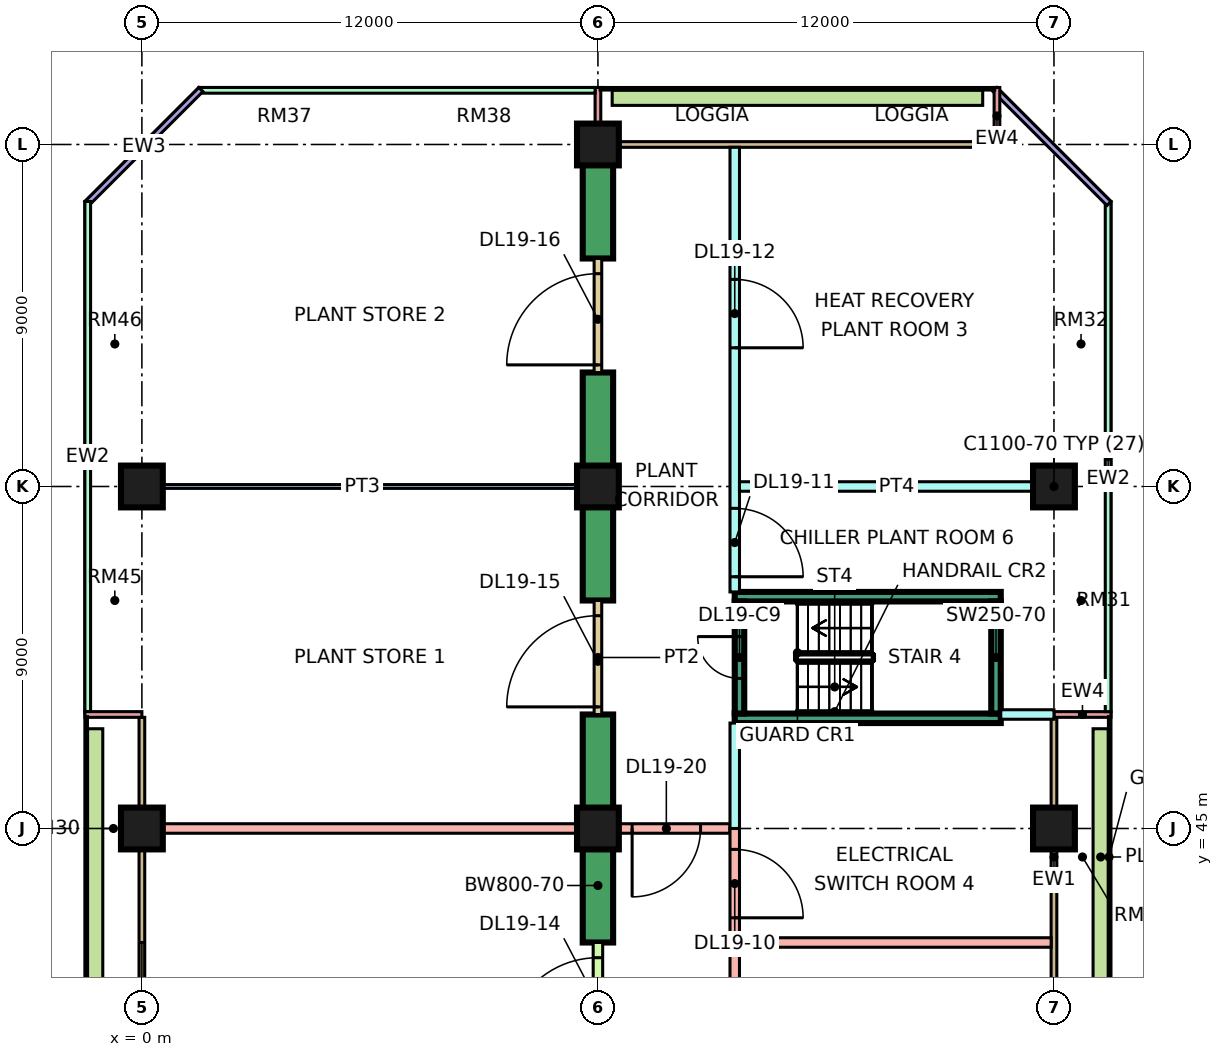
"""IFC4 building model, lengths in metres.
Left out: names, types, materials, properties, quantities, classifications, styles, units other than length and angle.
Written with IfcOpenShell. Run it as: python <this file> out.ifc"""

import sys

from ifc_helpers import new_model, si_unit, direction, frame, frame_2d, origin, origin_2d, place, context, subcontext, project, spatial, rectangle, extrude, element, fill, save


model = new_model("IFC4")
c1 = context("Model", 3, precision=1e-05, world=origin(), true_north=direction((0.0, 1.0)))
c2 = subcontext(c1, "Body", "Model", "MODEL_VIEW")
j1 = project(units=[si_unit("LENGTHUNIT", "METRE"), si_unit("PLANEANGLEUNIT", "RADIAN")], contexts=[c1])
p1 = place(None, origin())
s1 = spatial("IfcSite", under=j1, at=p1, CompositionType="ELEMENT")
p2 = place(p1, origin())
s2 = spatial("IfcBuilding", under=s1, at=p2, CompositionType="ELEMENT")
p3 = place(p2, frame((0.0, 0.0, 86.4)))
s3 = spatial("IfcBuildingStorey", under=s2, at=p3, CompositionType="ELEMENT", Elevation=86.4)
p4 = place(p3, frame((0.0, 45.0, 0.0), z_axis=(0.0, 0.0, 1.0), x_axis=(1.0, 0.0, 0.0)))
e1 = element("IfcColumn", 1, at=p4, inside=s3, PredefinedType="COLUMN", context=c2, shape_type="SweptSolid", body=[
    extrude(rectangle(XDim=1.1, YDim=1.1, at=origin_2d()), origin(), (0.0, 0.0, 1.0), 5.5),
])
p5 = place(p3, frame((0.0, 54.0, 0.0), z_axis=(0.0, 0.0, 1.0), x_axis=(1.0, 0.0, 0.0)))
e2 = element("IfcColumn", 2, at=p5, inside=s3, PredefinedType="COLUMN", context=c2, shape_type="SweptSolid", body=[
    extrude(rectangle(XDim=1.1, YDim=1.1, at=origin_2d()), origin(), (0.0, 0.0, 1.0), 5.5),
])
for number, where, z_axis, x_axis in (
    (3, (12.0, 45.0, 0.0), (0.0, 0.0, 1.0), (1.0, 0.0, 0.0)),
    (4, (12.0, 54.0, 0.0), (0.0, 0.0, 1.0), (1.0, 0.0, 0.0)),
    (5, (12.0, 63.0, 0.0), (0.0, 0.0, 1.0), (1.0, 0.0, 0.0)),
    (6, (24.0, 45.0, 0.0), (0.0, 0.0, 1.0), (1.0, 0.0, 0.0)),
    (7, (24.0, 54.0, 0.0), (0.0, 0.0, 1.0), (1.0, 0.0, 0.0)),
):
    element("IfcColumn", number, at=place(p3, frame(where, z_axis=z_axis, x_axis=x_axis)), inside=s3, PredefinedType="COLUMN", context=c2, shape_type="SweptSolid", body=[
        extrude(rectangle(XDim=1.1, YDim=1.1, at=origin_2d()), origin(), (0.0, 0.0, 1.0), 5.5),
    ])
for number, where, z_axis, x_axis in (
    (8, (15.6, 47.9, 0.0), (0.0, 0.0, 1.0), (1.0, 0.0, 0.0)),
    (9, (15.6, 51.1, 0.0), (0.0, 0.0, 1.0), (1.0, 0.0, 0.0)),
):
    element("IfcWall", number, at=place(p3, frame(where, z_axis=z_axis, x_axis=x_axis)), inside=s3, PredefinedType="SHEAR", context=c2, shape_type="SweptSolid", body=[
        extrude(rectangle(XDim=7.0, YDim=0.25, at=frame_2d((3.5, 0.0))), origin(), (0.0, 0.0, 1.0), 5.5),
    ])
p6 = place(p3, frame((15.725, 48.025, 0.0), z_axis=(0.0, 0.0, 1.0), x_axis=(0.0, 1.0, 0.0)))
e10 = element("IfcWall", 10, at=p6, inside=s3, PredefinedType="SHEAR", context=c2, shape_type="SweptSolid", body=[
    extrude(rectangle(XDim=2.95, YDim=0.25, at=frame_2d((1.475, 0.0))), origin(), (0.0, 0.0, 1.0), 5.5),
])
p7 = place(p6, frame((0.925, 0.0, 0.0)))
e11 = element("IfcOpeningElement", 11, at=p7, cuts=e10, PredefinedType="OPENING", context=c2, shape_type="SweptSolid", body=[
    extrude(rectangle(XDim=1.1, YDim=2.2, at=frame_2d((0.55, 1.1))), frame((0.0, 0.135, 0.0), z_axis=(0.0, -1.0, 0.0), x_axis=(1.0, 0.0, 0.0)), (0.0, 0.0, 1.0), 0.27),
])
p8 = place(p3, frame((22.475, 48.025, 0.0), z_axis=(0.0, 0.0, 1.0), x_axis=(0.0, 1.0, 0.0)))
e12 = element("IfcWall", 12, at=p8, inside=s3, PredefinedType="SHEAR", context=c2, shape_type="SweptSolid", body=[
    extrude(rectangle(XDim=2.95, YDim=0.25, at=frame_2d((1.475, 0.0))), origin(), (0.0, 0.0, 1.0), 5.5),
])
for number, where, z_axis, x_axis in (
    (13, (12.0, 42.0, 0.0), (0.0, 0.0, 1.0), (0.0, 1.0, 0.0)),
    (14, (12.0, 45.0, 0.0), (0.0, 0.0, 1.0), (0.0, 1.0, 0.0)),
    (15, (12.0, 51.0, 0.0), (0.0, 0.0, 1.0), (0.0, 1.0, 0.0)),
    (16, (12.0, 54.0, 0.0), (0.0, 0.0, 1.0), (0.0, 1.0, 0.0)),
    (17, (12.0, 60.0, 0.0), (0.0, 0.0, 1.0), (0.0, 1.0, 0.0)),
):
    element("IfcWall", number, at=place(p3, frame(where, z_axis=z_axis, x_axis=x_axis)), inside=s3, PredefinedType="SHEAR", context=c2, shape_type="SweptSolid", body=[
        extrude(rectangle(XDim=3.0, YDim=0.8, at=frame_2d((1.5, 0.0))), origin(), (0.0, 0.0, 1.0), 5.1),
    ])
p9 = place(p3, frame((24.0, 40.575, 0.0), z_axis=(0.0, 0.0, 1.0), x_axis=(0.0, 1.0, 0.0)))
e18 = element("IfcWall", 18, at=p9, inside=s3, PredefinedType="SOLIDWALL", context=c2, shape_type="SweptSolid", body=[
    extrude(rectangle(XDim=7.35, YDim=0.15, at=frame_2d((3.675, 0.0))), origin(), (0.0, 0.0, 1.0), 5.1),
])
p10 = place(p3, frame((25.5, 48.0, 0.0), z_axis=(0.0, 0.0, 1.0), x_axis=(-1.0, 0.0, 0.0)))
e19 = element("IfcWall", 19, at=p10, inside=s3, PredefinedType="SOLIDWALL", context=c2, shape_type="SweptSolid", body=[
    extrude(rectangle(XDim=1.5, YDim=0.15, at=frame_2d((0.75, 0.0))), origin(), (0.0, 0.0, 1.0), 5.1),
])
p11 = place(p3, frame((25.425, 48.075, 0.0), z_axis=(0.0, 0.0, 1.0), x_axis=(0.0, 1.0, 0.0)))
e20 = element("IfcWall", 20, at=p11, inside=s3, PredefinedType="SOLIDWALL", context=c2, shape_type="SweptSolid", body=[
    extrude(rectangle(XDim=13.425, YDim=0.15, at=frame_2d((6.712, 0.0))), origin(), (0.0, 0.0, 1.0), 5.1),
])
p12 = place(p3, frame((25.447, 61.447, 0.0), z_axis=(0.0, 0.0, 1.0), x_axis=(-0.707106781187, 0.707106781187, 0.0)))
e21 = element("IfcWall", 21, at=p12, inside=s3, PredefinedType="SOLIDWALL", context=c2, shape_type="SweptSolid", body=[
    extrude(rectangle(XDim=4.243, YDim=0.15, at=frame_2d((2.121, 0.0))), origin(), (0.0, 0.0, 1.0), 5.1),
])
p13 = place(p3, frame((22.425, 63.0, 0.0), z_axis=(0.0, 0.0, 1.0), x_axis=(-1.0, 0.0, 0.0)))
e22 = element("IfcWall", 22, at=p13, inside=s3, PredefinedType="SOLIDWALL", context=c2, shape_type="SweptSolid", body=[
    extrude(rectangle(XDim=10.35, YDim=0.15, at=frame_2d((5.175, 0.0))), origin(), (0.0, 0.0, 1.0), 5.1),
])
for number, where, z_axis, x_axis in (
    (23, (22.5, 64.5, 0.0), (0.0, 0.0, 1.0), (0.0, -1.0, 0.0)),
    (24, (12.0, 64.5, 0.0), (0.0, 0.0, 1.0), (0.0, -1.0, 0.0)),
):
    element("IfcWall", number, at=place(p3, frame(where, z_axis=z_axis, x_axis=x_axis)), inside=s3, PredefinedType="SOLIDWALL", context=c2, shape_type="SweptSolid", body=[
        extrude(rectangle(XDim=1.5, YDim=0.15, at=frame_2d((0.75, 0.0))), origin(), (0.0, 0.0, 1.0), 5.1),
    ])
p14 = place(p3, frame((11.925, 64.425, 0.0), z_axis=(0.0, 0.0, 1.0), x_axis=(-1.0, 0.0, 0.0)))
e25 = element("IfcWall", 25, at=p14, inside=s3, PredefinedType="SOLIDWALL", context=c2, shape_type="SweptSolid", body=[
    extrude(rectangle(XDim=10.425, YDim=0.15, at=frame_2d((5.212, 0.0))), origin(), (0.0, 0.0, 1.0), 5.1),
])
p15 = place(p3, frame((1.553, 64.447, 0.0), z_axis=(0.0, 0.0, 1.0), x_axis=(-0.707106781187, -0.707106781187, 0.0)))
e26 = element("IfcWall", 26, at=p15, inside=s3, PredefinedType="SOLIDWALL", context=c2, shape_type="SweptSolid", body=[
    extrude(rectangle(XDim=4.243, YDim=0.15, at=frame_2d((2.121, 0.0))), origin(), (0.0, 0.0, 1.0), 5.1),
])
p16 = place(p3, frame((-1.425, 61.5, 0.0), z_axis=(0.0, 0.0, 1.0), x_axis=(0.0, -1.0, 0.0)))
e27 = element("IfcWall", 27, at=p16, inside=s3, PredefinedType="SOLIDWALL", context=c2, shape_type="SweptSolid", body=[
    extrude(rectangle(XDim=13.425, YDim=0.15, at=frame_2d((6.712, 0.0))), origin(), (0.0, 0.0, 1.0), 5.1),
])
p17 = place(p3, frame((0.0, 47.925, 0.0), z_axis=(0.0, 0.0, 1.0), x_axis=(0.0, -1.0, 0.0)))
e28 = element("IfcWall", 28, at=p17, inside=s3, PredefinedType="SOLIDWALL", context=c2, shape_type="SweptSolid", body=[
    extrude(rectangle(XDim=11.85, YDim=0.15, at=frame_2d((5.925, 0.0))), origin(), (0.0, 0.0, 1.0), 5.1),
])
p18 = place(p17, frame((5.925, 0.0, 0.45)))
e29 = element("IfcOpeningElement", 29, at=p18, cuts=e28, PredefinedType="OPENING", context=c2, shape_type="SweptSolid", body=[
    extrude(rectangle(XDim=3.0, YDim=3.6, at=frame_2d((1.5, 1.8))), frame((0.0, 0.085, 0.0), z_axis=(0.0, -1.0, 0.0), x_axis=(1.0, 0.0, 0.0)), (0.0, 0.0, 1.0), 0.17),
])
p19 = place(p3, frame((-1.5, 48.0, 0.0), z_axis=(0.0, 0.0, 1.0), x_axis=(1.0, 0.0, 0.0)))
e30 = element("IfcWall", 30, at=p19, inside=s3, PredefinedType="SOLIDWALL", context=c2, shape_type="SweptSolid", body=[
    extrude(rectangle(XDim=1.5, YDim=0.15, at=frame_2d((0.75, 0.0))), origin(), (0.0, 0.0, 1.0), 5.1),
])
p20 = place(p3, frame((25.229, 40.875, 0.0), z_axis=(0.0, 0.0, 1.0), x_axis=(0.0, 1.0, 0.0)))
e31 = element("IfcWall", 31, at=p20, inside=s3, PredefinedType="SOLIDWALL", context=c2, shape_type="SweptSolid", body=[
    extrude(rectangle(XDim=6.75, YDim=0.4, at=frame_2d((3.375, 0.0))), origin(), (0.0, 0.0, 1.0), 0.7),
])
p21 = place(p3, frame((22.125, 64.229, 0.0), z_axis=(0.0, 0.0, 1.0), x_axis=(-1.0, 0.0, 0.0)))
e32 = element("IfcWall", 32, at=p21, inside=s3, PredefinedType="SOLIDWALL", context=c2, shape_type="SweptSolid", body=[
    extrude(rectangle(XDim=9.75, YDim=0.4, at=frame_2d((4.875, 0.0))), origin(), (0.0, 0.0, 1.0), 0.7),
])
p22 = place(p3, frame((-1.229, 47.625, 0.0), z_axis=(0.0, 0.0, 1.0), x_axis=(0.0, -1.0, 0.0)))
e33 = element("IfcWall", 33, at=p22, inside=s3, PredefinedType="SOLIDWALL", context=c2, shape_type="SweptSolid", body=[
    extrude(rectangle(XDim=11.25, YDim=0.4, at=frame_2d((5.625, 0.0))), origin(), (0.0, 0.0, 1.0), 0.7),
])
e34 = element("IfcWall", 34, at=p5, inside=s3, PredefinedType="PARTITIONING", context=c2, shape_type="SweptSolid", body=[
    extrude(rectangle(XDim=11.601, YDim=0.1, at=frame_2d((5.801, 0.0))), origin(), (0.0, 0.0, 1.0), 5.1),
])
p23 = place(p3, frame((0.074, 45.0, 0.0), z_axis=(0.0, 0.0, 1.0), x_axis=(1.0, 0.0, 0.0)))
e35 = element("IfcWall", 35, at=p23, inside=s3, PredefinedType="PARTITIONING", context=c2, shape_type="SweptSolid", body=[
    extrude(rectangle(XDim=11.527, YDim=0.25, at=frame_2d((5.764, 0.0))), origin(), (0.0, 0.0, 1.0), 5.1),
])
p24 = place(p3, frame((12.0, 38.999, 0.0), z_axis=(0.0, 0.0, 1.0), x_axis=(0.0, 1.0, 0.0)))
e36 = element("IfcWall", 36, at=p24, inside=s3, PredefinedType="PARTITIONING", context=c2, shape_type="SweptSolid", body=[
    extrude(rectangle(XDim=3.002, YDim=0.25, at=frame_2d((1.501, 0.0))), origin(), (0.0, 0.0, 1.0), 3.05),
])
p25 = place(p24, frame((0.201, 0.0, 0.0)))
e37 = element("IfcOpeningElement", 37, at=p25, cuts=e36, PredefinedType="OPENING", context=c2, shape_type="SweptSolid", body=[
    extrude(rectangle(XDim=2.4, YDim=2.1, at=frame_2d((1.2, 1.05))), frame((0.0, 0.135, 0.0), z_axis=(0.0, -1.0, 0.0), x_axis=(1.0, 0.0, 0.0)), (0.0, 0.0, 1.0), 0.27),
])
p26 = place(p3, frame((12.0, 47.999, 0.0), z_axis=(0.0, 0.0, 1.0), x_axis=(0.0, 1.0, 0.0)))
e38 = element("IfcWall", 38, at=p26, inside=s3, PredefinedType="PARTITIONING", context=c2, shape_type="SweptSolid", body=[
    extrude(rectangle(XDim=3.002, YDim=0.2, at=frame_2d((1.501, 0.0))), origin(), (0.0, 0.0, 1.0), 3.05),
])
p27 = place(p26, frame((0.201, 0.0, 0.0)))
e39 = element("IfcOpeningElement", 39, at=p27, cuts=e38, PredefinedType="OPENING", context=c2, shape_type="SweptSolid", body=[
    extrude(rectangle(XDim=2.4, YDim=2.1, at=frame_2d((1.2, 1.05))), frame((0.0, 0.11, 0.0), z_axis=(0.0, -1.0, 0.0), x_axis=(1.0, 0.0, 0.0)), (0.0, 0.0, 1.0), 0.22),
])
p28 = place(p3, frame((12.0, 56.999, 0.0), z_axis=(0.0, 0.0, 1.0), x_axis=(0.0, 1.0, 0.0)))
e40 = element("IfcWall", 40, at=p28, inside=s3, PredefinedType="PARTITIONING", context=c2, shape_type="SweptSolid", body=[
    extrude(rectangle(XDim=3.002, YDim=0.2, at=frame_2d((1.501, 0.0))), origin(), (0.0, 0.0, 1.0), 3.05),
])
p29 = place(p28, frame((0.201, 0.0, 0.0)))
e41 = element("IfcOpeningElement", 41, at=p29, cuts=e40, PredefinedType="OPENING", context=c2, shape_type="SweptSolid", body=[
    extrude(rectangle(XDim=2.4, YDim=2.1, at=frame_2d((1.2, 1.05))), frame((0.0, 0.11, 0.0), z_axis=(0.0, -1.0, 0.0), x_axis=(1.0, 0.0, 0.0)), (0.0, 0.0, 1.0), 0.22),
])
p30 = place(p3, frame((12.399, 45.0, 0.0), z_axis=(0.0, 0.0, 1.0), x_axis=(1.0, 0.0, 0.0)))
e42 = element("IfcWall", 42, at=p30, inside=s3, PredefinedType="PARTITIONING", context=c2, shape_type="SweptSolid", body=[
    extrude(rectangle(XDim=3.076, YDim=0.25, at=frame_2d((1.538, 0.0))), origin(), (0.0, 0.0, 1.0), 5.1),
])
p31 = place(p30, frame((0.501, 0.0, 0.0)))
e43 = element("IfcOpeningElement", 43, at=p31, cuts=e42, PredefinedType="OPENING", context=c2, shape_type="SweptSolid", body=[
    extrude(rectangle(XDim=1.8, YDim=2.1, at=frame_2d((0.9, 1.05))), frame((0.0, 0.135, 0.0), z_axis=(0.0, -1.0, 0.0), x_axis=(1.0, 0.0, 0.0)), (0.0, 0.0, 1.0), 0.27),
])
p32 = place(p3, frame((15.6, 20.0, 0.0), z_axis=(0.0, 0.0, 1.0), x_axis=(0.0, 1.0, 0.0)))
e44 = element("IfcWall", 44, at=p32, inside=s3, PredefinedType="PARTITIONING", context=c2, shape_type="SweptSolid", body=[
    extrude(rectangle(XDim=25.0, YDim=0.25, at=frame_2d((12.5, 0.0))), origin(), (0.0, 0.0, 1.0), 5.1),
])
p33 = place(p32, frame((18.15, 0.0, 0.0)))
e45 = element("IfcOpeningElement", 45, at=p33, cuts=e44, PredefinedType="OPENING", context=c2, shape_type="SweptSolid", body=[
    extrude(rectangle(XDim=1.8, YDim=2.1, at=frame_2d((0.9, 1.05))), frame((0.0, 0.135, 0.0), z_axis=(0.0, -1.0, 0.0), x_axis=(1.0, 0.0, 0.0)), (0.0, 0.0, 1.0), 0.27),
])
p34 = place(p32, frame((22.65, 0.0, 0.0)))
e46 = element("IfcOpeningElement", 46, at=p34, cuts=e44, PredefinedType="OPENING", context=c2, shape_type="SweptSolid", body=[
    extrude(rectangle(XDim=1.8, YDim=2.1, at=frame_2d((0.9, 1.05))), frame((0.0, 0.135, 0.0), z_axis=(0.0, -1.0, 0.0), x_axis=(1.0, 0.0, 0.0)), (0.0, 0.0, 1.0), 0.27),
])
p35 = place(p32, frame((14.65, 0.0, 0.0)))
e47 = element("IfcOpeningElement", 47, at=p35, cuts=e44, PredefinedType="OPENING", context=c2, shape_type="SweptSolid", body=[
    extrude(rectangle(XDim=0.9, YDim=2.1, at=frame_2d((0.45, 1.05))), frame((0.0, 0.135, 0.0), z_axis=(0.0, -1.0, 0.0), x_axis=(1.0, 0.0, 0.0)), (0.0, 0.0, 1.0), 0.27),
])
p36 = place(p32, frame((11.4, 0.0, 0.0)))
e48 = element("IfcOpeningElement", 48, at=p36, cuts=e44, PredefinedType="OPENING", context=c2, shape_type="SweptSolid", body=[
    extrude(rectangle(XDim=0.9, YDim=2.1, at=frame_2d((0.45, 1.05))), frame((0.0, 0.135, 0.0), z_axis=(0.0, -1.0, 0.0), x_axis=(1.0, 0.0, 0.0)), (0.0, 0.0, 1.0), 0.27),
])
p37 = place(p3, frame((15.6, 45.0, 0.0), z_axis=(0.0, 0.0, 1.0), x_axis=(0.0, 1.0, 0.0)))
e49 = element("IfcWall", 49, at=p37, inside=s3, PredefinedType="PARTITIONING", context=c2, shape_type="SweptSolid", body=[
    extrude(rectangle(XDim=2.775, YDim=0.25, at=frame_2d((1.387, 0.0))), origin(), (0.0, 0.0, 1.0), 5.1),
])
p38 = place(p3, frame((15.6, 51.225, 0.0), z_axis=(0.0, 0.0, 1.0), x_axis=(0.0, 1.0, 0.0)))
e50 = element("IfcWall", 50, at=p38, inside=s3, PredefinedType="PARTITIONING", context=c2, shape_type="SweptSolid", body=[
    extrude(rectangle(XDim=11.701, YDim=0.25, at=frame_2d((5.851, 0.0))), origin(), (0.0, 0.0, 1.0), 5.1),
])
p39 = place(p38, frame((0.4, 0.0, 0.0)))
e51 = element("IfcOpeningElement", 51, at=p39, cuts=e50, PredefinedType="OPENING", context=c2, shape_type="SweptSolid", body=[
    extrude(rectangle(XDim=1.8, YDim=2.1, at=frame_2d((0.9, 1.05))), frame((0.0, 0.135, 0.0), z_axis=(0.0, -1.0, 0.0), x_axis=(1.0, 0.0, 0.0)), (0.0, 0.0, 1.0), 0.27),
])
p40 = place(p38, frame((6.425, 0.0, 0.0)))
e52 = element("IfcOpeningElement", 52, at=p40, cuts=e50, PredefinedType="OPENING", context=c2, shape_type="SweptSolid", body=[
    extrude(rectangle(XDim=1.8, YDim=2.1, at=frame_2d((0.9, 1.05))), frame((0.0, 0.135, 0.0), z_axis=(0.0, -1.0, 0.0), x_axis=(1.0, 0.0, 0.0)), (0.0, 0.0, 1.0), 0.27),
])
p41 = place(p3, frame((15.725, 42.0, 0.0), z_axis=(0.0, 0.0, 1.0), x_axis=(1.0, 0.0, 0.0)))
e53 = element("IfcWall", 53, at=p41, inside=s3, PredefinedType="PARTITIONING", context=c2, shape_type="SweptSolid", body=[
    extrude(rectangle(XDim=8.201, YDim=0.25, at=frame_2d((4.101, 0.0))), origin(), (0.0, 0.0, 1.0), 5.1),
])
p42 = place(p3, frame((15.725, 54.0, 0.0), z_axis=(0.0, 0.0, 1.0), x_axis=(1.0, 0.0, 0.0)))
e54 = element("IfcWall", 54, at=p42, inside=s3, PredefinedType="PARTITIONING", context=c2, shape_type="SweptSolid", body=[
    extrude(rectangle(XDim=8.275, YDim=0.25, at=frame_2d((4.137, 0.0))), origin(), (0.0, 0.0, 1.0), 5.1),
])
p43 = place(p3, frame((22.6, 48.0, 0.0), z_axis=(0.0, 0.0, 1.0), x_axis=(1.0, 0.0, 0.0)))
e55 = element("IfcWall", 55, at=p43, inside=s3, PredefinedType="PARTITIONING", context=c2, shape_type="SweptSolid", body=[
    extrude(rectangle(XDim=1.4, YDim=0.25, at=frame_2d((0.7, 0.0))), origin(), (0.0, 0.0, 1.0), 5.1),
])
p44 = place(p18, origin())
e56 = element("IfcWindow", 56, at=p44, inside=s3, PartitioningType="SINGLE_PANEL", PredefinedType="WINDOW", context=c2, shape_type="SweptSolid", body=[
    extrude(rectangle(XDim=3.0, YDim=3.6, at=frame_2d((1.5, 1.8))), frame((0.0, 0.03, 0.0), z_axis=(0.0, -1.0, 0.0), x_axis=(1.0, 0.0, 0.0)), (0.0, 0.0, 1.0), 0.06),
])
fill(e29, e56)
p45 = place(p7, frame((1.1, 0.0, 0.0), z_axis=(0.0, 0.0, 1.0), x_axis=(-1.0, 0.0, 0.0)))
e57 = element("IfcDoor", 57, at=p45, inside=s3, OperationType="SINGLE_SWING_RIGHT", PredefinedType="DOOR", context=c2, shape_type="SweptSolid", body=[
    extrude(rectangle(XDim=1.1, YDim=2.2, at=frame_2d((0.55, 1.1))), frame((0.0, 0.025, 0.0), z_axis=(0.0, -1.0, 0.0), x_axis=(1.0, 0.0, 0.0)), (0.0, 0.0, 1.0), 0.05),
])
fill(e11, e57)
p46 = place(p34, frame((1.8, 0.0, 0.0), z_axis=(0.0, 0.0, 1.0), x_axis=(-1.0, 0.0, 0.0)))
e58 = element("IfcDoor", 58, at=p46, inside=s3, OperationType="DOUBLE_DOOR_SINGLE_SWING", PredefinedType="DOOR", context=c2, shape_type="SweptSolid", body=[
    extrude(rectangle(XDim=1.8, YDim=2.1, at=frame_2d((0.9, 1.05))), frame((0.0, 0.025, 0.0), z_axis=(0.0, -1.0, 0.0), x_axis=(1.0, 0.0, 0.0)), (0.0, 0.0, 1.0), 0.05),
])
fill(e46, e58)
p47 = place(p39, frame((1.8, 0.0, 0.0), z_axis=(0.0, 0.0, 1.0), x_axis=(-1.0, 0.0, 0.0)))
e59 = element("IfcDoor", 59, at=p47, inside=s3, OperationType="DOUBLE_DOOR_SINGLE_SWING", PredefinedType="DOOR", context=c2, shape_type="SweptSolid", body=[
    extrude(rectangle(XDim=1.8, YDim=2.1, at=frame_2d((0.9, 1.05))), frame((0.0, 0.025, 0.0), z_axis=(0.0, -1.0, 0.0), x_axis=(1.0, 0.0, 0.0)), (0.0, 0.0, 1.0), 0.05),
])
fill(e51, e59)
p48 = place(p40, frame((1.8, 0.0, 0.0), z_axis=(0.0, 0.0, 1.0), x_axis=(-1.0, 0.0, 0.0)))
e60 = element("IfcDoor", 60, at=p48, inside=s3, OperationType="DOUBLE_DOOR_SINGLE_SWING", PredefinedType="DOOR", context=c2, shape_type="SweptSolid", body=[
    extrude(rectangle(XDim=1.8, YDim=2.1, at=frame_2d((0.9, 1.05))), frame((0.0, 0.025, 0.0), z_axis=(0.0, -1.0, 0.0), x_axis=(1.0, 0.0, 0.0)), (0.0, 0.0, 1.0), 0.05),
])
fill(e52, e60)
p49 = place(p25, origin())
e61 = element("IfcDoor", 61, at=p49, inside=s3, OperationType="DOUBLE_DOOR_SINGLE_SWING", PredefinedType="DOOR", context=c2, shape_type="SweptSolid", body=[
    extrude(rectangle(XDim=2.4, YDim=2.1, at=frame_2d((1.2, 1.05))), frame((0.0, 0.025, 0.0), z_axis=(0.0, -1.0, 0.0), x_axis=(1.0, 0.0, 0.0)), (0.0, 0.0, 1.0), 0.05),
])
fill(e37, e61)
p50 = place(p27, origin())
e62 = element("IfcDoor", 62, at=p50, inside=s3, OperationType="DOUBLE_DOOR_SINGLE_SWING", PredefinedType="DOOR", context=c2, shape_type="SweptSolid", body=[
    extrude(rectangle(XDim=2.4, YDim=2.1, at=frame_2d((1.2, 1.05))), frame((0.0, 0.025, 0.0), z_axis=(0.0, -1.0, 0.0), x_axis=(1.0, 0.0, 0.0)), (0.0, 0.0, 1.0), 0.05),
])
fill(e39, e62)
p51 = place(p29, origin())
e63 = element("IfcDoor", 63, at=p51, inside=s3, OperationType="DOUBLE_DOOR_SINGLE_SWING", PredefinedType="DOOR", context=c2, shape_type="SweptSolid", body=[
    extrude(rectangle(XDim=2.4, YDim=2.1, at=frame_2d((1.2, 1.05))), frame((0.0, 0.025, 0.0), z_axis=(0.0, -1.0, 0.0), x_axis=(1.0, 0.0, 0.0)), (0.0, 0.0, 1.0), 0.05),
])
fill(e41, e63)
p52 = place(p31, frame((1.8, 0.0, 0.0), z_axis=(0.0, 0.0, 1.0), x_axis=(-1.0, 0.0, 0.0)))
e64 = element("IfcDoor", 64, at=p52, inside=s3, OperationType="DOUBLE_DOOR_SINGLE_SWING", PredefinedType="DOOR", context=c2, shape_type="SweptSolid", body=[
    extrude(rectangle(XDim=1.8, YDim=2.1, at=frame_2d((0.9, 1.05))), frame((0.0, 0.025, 0.0), z_axis=(0.0, -1.0, 0.0), x_axis=(1.0, 0.0, 0.0)), (0.0, 0.0, 1.0), 0.05),
])
fill(e43, e64)
save(model, sys.argv[1])
